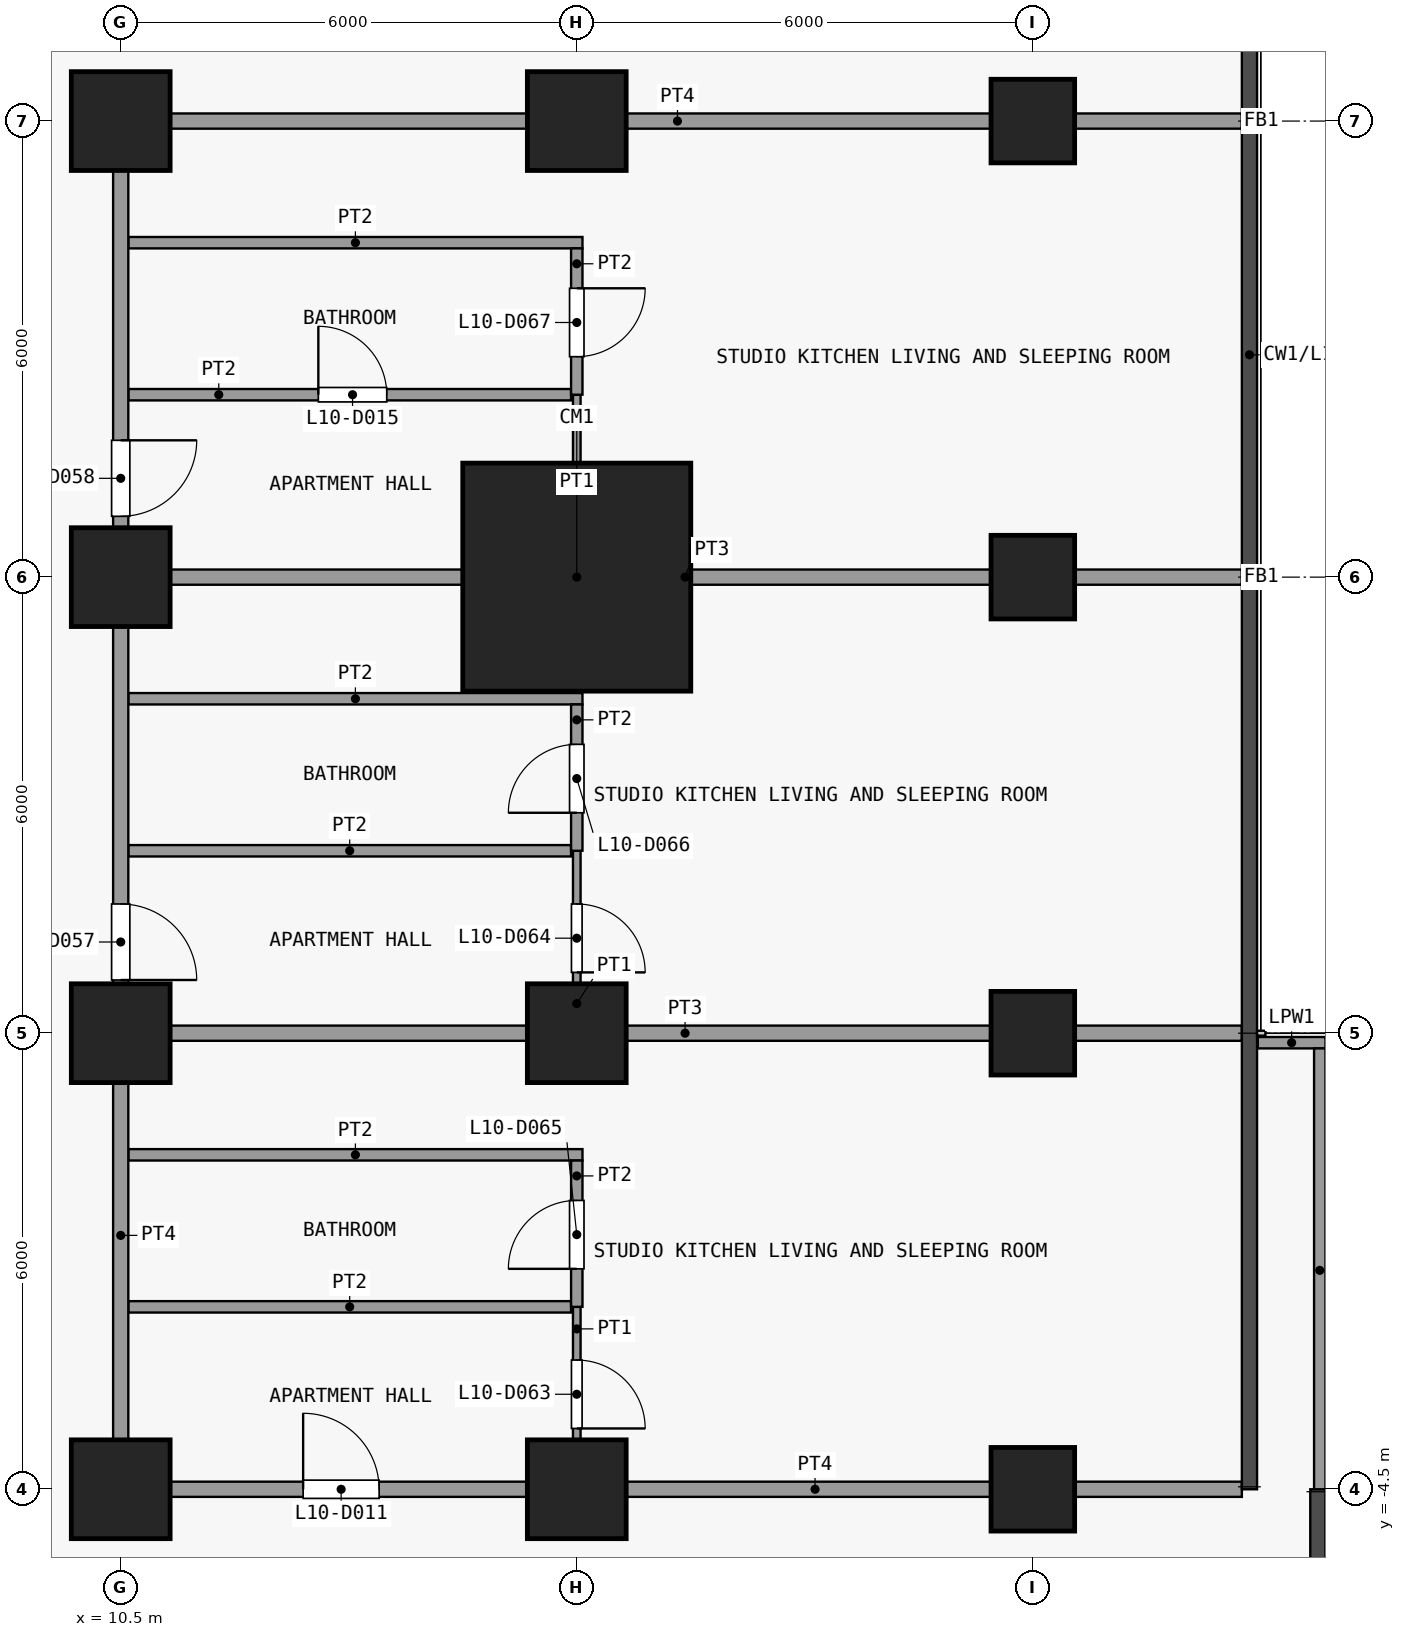
"""IFC4 building model, lengths in metres.
Left out: names, types, materials, properties, quantities, classifications, styles, units other than length and angle.
Written with IfcOpenShell. Run it as: python <this file> out.ifc"""

import sys

from ifc_helpers import new_model, si_unit, direction, frame, frame_2d, origin, origin_2d, place, context, subcontext, project, spatial, rectangle, extrude, element, fill, save


model = new_model("IFC4")
c1 = context("Model", 3, precision=1e-05, world=origin(), true_north=direction((0.0, 1.0)))
c2 = subcontext(c1, "Body", "Model", "MODEL_VIEW")
j1 = project(units=[si_unit("LENGTHUNIT", "METRE"), si_unit("PLANEANGLEUNIT", "RADIAN")], contexts=[c1])
p1 = place(None, origin())
s1 = spatial("IfcSite", under=j1, at=p1, CompositionType="ELEMENT")
p2 = place(p1, origin())
s2 = spatial("IfcBuilding", under=s1, at=p2, CompositionType="ELEMENT")
p3 = place(p2, frame((0.0, 0.0, 46.9)))
s3 = spatial("IfcBuildingStorey", under=s2, at=p3, CompositionType="ELEMENT", Elevation=46.9)
for number, where, z_axis, x_axis in (
    (1, (10.5, -4.5, 0.0), (0.0, 0.0, 1.0), (1.0, 0.0, 0.0)),
    (2, (10.5, 1.5, 0.0), (0.0, 0.0, 1.0), (1.0, 0.0, 0.0)),
    (3, (10.5, 7.5, 0.0), (0.0, 0.0, 1.0), (1.0, 0.0, 0.0)),
    (4, (10.5, 13.5, 0.0), (0.0, 0.0, 1.0), (1.0, 0.0, 0.0)),
    (5, (16.5, -4.5, 0.0), (0.0, 0.0, 1.0), (1.0, 0.0, 0.0)),
    (6, (16.5, 1.5, 0.0), (0.0, 0.0, 1.0), (1.0, 0.0, 0.0)),
):
    element("IfcColumn", number, at=place(p3, frame(where, z_axis=z_axis, x_axis=x_axis)), inside=s3, PredefinedType="COLUMN", context=c2, shape_type="SweptSolid", body=[
        extrude(rectangle(XDim=1.3, YDim=1.3, at=origin_2d()), origin(), (0.0, 0.0, 1.0), 3.6),
    ])
p4 = place(p3, frame((16.5, 7.5, 0.0), z_axis=(0.0, 0.0, 1.0), x_axis=(1.0, 0.0, 0.0)))
e7 = element("IfcColumn", 7, at=p4, inside=s3, PredefinedType="COLUMN", context=c2, shape_type="SweptSolid", body=[
    extrude(rectangle(XDim=3.0, YDim=3.0, at=origin_2d()), origin(), (0.0, 0.0, 1.0), 3.6),
])
p5 = place(p3, frame((16.5, 13.5, 0.0), z_axis=(0.0, 0.0, 1.0), x_axis=(1.0, 0.0, 0.0)))
e8 = element("IfcColumn", 8, at=p5, inside=s3, PredefinedType="COLUMN", context=c2, shape_type="SweptSolid", body=[
    extrude(rectangle(XDim=1.3, YDim=1.3, at=origin_2d()), origin(), (0.0, 0.0, 1.0), 3.6),
])
for number, where, z_axis, x_axis in (
    (9, (22.5, -4.5, 0.0), (0.0, 0.0, 1.0), (1.0, 0.0, 0.0)),
    (10, (22.5, 1.5, 0.0), (0.0, 0.0, 1.0), (1.0, 0.0, 0.0)),
    (11, (22.5, 7.5, 0.0), (0.0, 0.0, 1.0), (1.0, 0.0, 0.0)),
    (12, (22.5, 13.5, 0.0), (0.0, 0.0, 1.0), (1.0, 0.0, 0.0)),
):
    element("IfcColumn", number, at=place(p3, frame(where, z_axis=z_axis, x_axis=x_axis)), inside=s3, PredefinedType="COLUMN", context=c2, shape_type="SweptSolid", body=[
        extrude(rectangle(XDim=1.1, YDim=1.1, at=origin_2d()), origin(), (0.0, 0.0, 1.0), 3.6),
    ])
p6 = place(p3, frame((25.46, 1.375, 0.0), z_axis=(0.0, 0.0, 1.0), x_axis=(1.0, 0.0, 0.0)))
e13 = element("IfcWall", 13, at=p6, inside=s3, PredefinedType="PARAPET", context=c2, shape_type="SweptSolid", body=[
    extrude(rectangle(XDim=0.89, YDim=0.15, at=frame_2d((0.445, 0.0))), origin(), (0.0, 0.0, 1.0), 1.15),
])
p7 = place(p3, frame((26.275, 1.3, 0.0), z_axis=(0.0, 0.0, 1.0), x_axis=(0.0, -1.0, 0.0)))
e14 = element("IfcWall", 14, at=p7, inside=s3, PredefinedType="PARAPET", context=c2, shape_type="SweptSolid", body=[
    extrude(rectangle(XDim=5.84, YDim=0.15, at=frame_2d((2.92, 0.0))), origin(), (0.0, 0.0, 1.0), 1.15),
])
p8 = place(p3, frame((10.4, -4.5, 0.0), z_axis=(0.0, 0.0, 1.0), x_axis=(1.0, 0.0, 0.0)))
e15 = element("IfcWall", 15, at=p8, inside=s3, PredefinedType="PARTITIONING", context=c2, shape_type="SweptSolid", body=[
    extrude(rectangle(XDim=14.85, YDim=0.2, at=frame_2d((7.425, 0.0))), origin(), (0.0, 0.0, 1.0), 3.3),
])
p9 = place(p8, frame((2.5, 0.0, 0.0)))
e16 = element("IfcOpeningElement", 16, at=p9, cuts=e15, PredefinedType="OPENING", context=c2, shape_type="SweptSolid", body=[
    extrude(rectangle(XDim=1.0, YDim=2.1, at=frame_2d((0.5, 1.05))), frame((0.0, 0.11, 0.0), z_axis=(0.0, -1.0, 0.0), x_axis=(1.0, 0.0, 0.0)), (0.0, 0.0, 1.0), 0.22),
])
p10 = place(p3, frame((10.6, -2.1, 0.0), z_axis=(0.0, 0.0, 1.0), x_axis=(1.0, 0.0, 0.0)))
e17 = element("IfcWall", 17, at=p10, inside=s3, PredefinedType="PARTITIONING", context=c2, shape_type="SweptSolid", body=[
    extrude(rectangle(XDim=5.825, YDim=0.15, at=frame_2d((2.913, 0.0))), origin(), (0.0, 0.0, 1.0), 3.3),
])
p11 = place(p3, frame((10.6, -0.1, 0.0), z_axis=(0.0, 0.0, 1.0), x_axis=(1.0, 0.0, 0.0)))
e18 = element("IfcWall", 18, at=p11, inside=s3, PredefinedType="PARTITIONING", context=c2, shape_type="SweptSolid", body=[
    extrude(rectangle(XDim=5.975, YDim=0.15, at=frame_2d((2.987, 0.0))), origin(), (0.0, 0.0, 1.0), 3.3),
])
p12 = place(p3, frame((10.6, 1.5, 0.0), z_axis=(0.0, 0.0, 1.0), x_axis=(1.0, 0.0, 0.0)))
e19 = element("IfcWall", 19, at=p12, inside=s3, PredefinedType="PARTITIONING", context=c2, shape_type="SweptSolid", body=[
    extrude(rectangle(XDim=14.65, YDim=0.2, at=frame_2d((7.325, 0.0))), origin(), (0.0, 0.0, 1.0), 3.3),
])
p13 = place(p3, frame((10.6, 3.9, 0.0), z_axis=(0.0, 0.0, 1.0), x_axis=(1.0, 0.0, 0.0)))
e20 = element("IfcWall", 20, at=p13, inside=s3, PredefinedType="PARTITIONING", context=c2, shape_type="SweptSolid", body=[
    extrude(rectangle(XDim=5.825, YDim=0.15, at=frame_2d((2.913, 0.0))), origin(), (0.0, 0.0, 1.0), 3.3),
])
p14 = place(p3, frame((10.6, 5.9, 0.0), z_axis=(0.0, 0.0, 1.0), x_axis=(1.0, 0.0, 0.0)))
e21 = element("IfcWall", 21, at=p14, inside=s3, PredefinedType="PARTITIONING", context=c2, shape_type="SweptSolid", body=[
    extrude(rectangle(XDim=5.975, YDim=0.15, at=frame_2d((2.987, 0.0))), origin(), (0.0, 0.0, 1.0), 3.3),
])
p15 = place(p3, frame((10.6, 7.5, 0.0), z_axis=(0.0, 0.0, 1.0), x_axis=(1.0, 0.0, 0.0)))
e22 = element("IfcWall", 22, at=p15, inside=s3, PredefinedType="PARTITIONING", context=c2, shape_type="SweptSolid", body=[
    extrude(rectangle(XDim=14.65, YDim=0.2, at=frame_2d((7.325, 0.0))), origin(), (0.0, 0.0, 1.0), 3.3),
])
p16 = place(p3, frame((10.6, 9.9, 0.0), z_axis=(0.0, 0.0, 1.0), x_axis=(1.0, 0.0, 0.0)))
e23 = element("IfcWall", 23, at=p16, inside=s3, PredefinedType="PARTITIONING", context=c2, shape_type="SweptSolid", body=[
    extrude(rectangle(XDim=5.825, YDim=0.15, at=frame_2d((2.913, 0.0))), origin(), (0.0, 0.0, 1.0), 3.3),
])
p17 = place(p16, frame((2.5, 0.0, 0.0)))
e24 = element("IfcOpeningElement", 24, at=p17, cuts=e23, PredefinedType="OPENING", context=c2, shape_type="SweptSolid", body=[
    extrude(rectangle(XDim=0.9, YDim=2.1, at=frame_2d((0.45, 1.05))), frame((0.0, 0.085, 0.0), z_axis=(0.0, -1.0, 0.0), x_axis=(1.0, 0.0, 0.0)), (0.0, 0.0, 1.0), 0.17),
])
p18 = place(p3, frame((10.6, 11.9, 0.0), z_axis=(0.0, 0.0, 1.0), x_axis=(1.0, 0.0, 0.0)))
e25 = element("IfcWall", 25, at=p18, inside=s3, PredefinedType="PARTITIONING", context=c2, shape_type="SweptSolid", body=[
    extrude(rectangle(XDim=5.975, YDim=0.15, at=frame_2d((2.987, 0.0))), origin(), (0.0, 0.0, 1.0), 3.3),
])
p19 = place(p3, frame((10.4, 13.5, 0.0), z_axis=(0.0, 0.0, 1.0), x_axis=(1.0, 0.0, 0.0)))
e26 = element("IfcWall", 26, at=p19, inside=s3, PredefinedType="PARTITIONING", context=c2, shape_type="SweptSolid", body=[
    extrude(rectangle(XDim=14.85, YDim=0.2, at=frame_2d((7.425, 0.0))), origin(), (0.0, 0.0, 1.0), 3.3),
])
p20 = place(p3, frame((10.5, -4.4, 0.0), z_axis=(0.0, 0.0, 1.0), x_axis=(0.0, 1.0, 0.0)))
e27 = element("IfcWall", 27, at=p20, inside=s3, PredefinedType="PARTITIONING", context=c2, shape_type="SweptSolid", body=[
    extrude(rectangle(XDim=17.8, YDim=0.2, at=frame_2d((8.9, 0.0))), origin(), (0.0, 0.0, 1.0), 3.3),
])
p21 = place(p20, frame((6.6, 0.0, 0.0)))
e28 = element("IfcOpeningElement", 28, at=p21, cuts=e27, PredefinedType="OPENING", context=c2, shape_type="SweptSolid", body=[
    extrude(rectangle(XDim=1.0, YDim=2.1, at=frame_2d((0.5, 1.05))), frame((0.0, 0.11, 0.0), z_axis=(0.0, -1.0, 0.0), x_axis=(1.0, 0.0, 0.0)), (0.0, 0.0, 1.0), 0.22),
])
p22 = place(p20, frame((12.7, 0.0, 0.0)))
e29 = element("IfcOpeningElement", 29, at=p22, cuts=e27, PredefinedType="OPENING", context=c2, shape_type="SweptSolid", body=[
    extrude(rectangle(XDim=1.0, YDim=2.1, at=frame_2d((0.5, 1.05))), frame((0.0, 0.11, 0.0), z_axis=(0.0, -1.0, 0.0), x_axis=(1.0, 0.0, 0.0)), (0.0, 0.0, 1.0), 0.22),
])
p23 = place(p3, frame((16.5, -4.4, 0.0), z_axis=(0.0, 0.0, 1.0), x_axis=(0.0, 1.0, 0.0)))
e30 = element("IfcWall", 30, at=p23, inside=s3, PredefinedType="PARTITIONING", context=c2, shape_type="SweptSolid", body=[
    extrude(rectangle(XDim=2.3, YDim=0.1, at=frame_2d((1.15, 0.0))), origin(), (0.0, 0.0, 1.0), 3.3),
])
p24 = place(p23, frame((0.7, 0.0, 0.0)))
e31 = element("IfcOpeningElement", 31, at=p24, cuts=e30, PredefinedType="OPENING", context=c2, shape_type="SweptSolid", body=[
    extrude(rectangle(XDim=0.9, YDim=2.1, at=frame_2d((0.45, 1.05))), frame((0.0, 0.06, 0.0), z_axis=(0.0, -1.0, 0.0), x_axis=(1.0, 0.0, 0.0)), (0.0, 0.0, 1.0), 0.12),
])
p25 = place(p3, frame((16.5, 1.6, 0.0), z_axis=(0.0, 0.0, 1.0), x_axis=(0.0, 1.0, 0.0)))
e32 = element("IfcWall", 32, at=p25, inside=s3, PredefinedType="PARTITIONING", context=c2, shape_type="SweptSolid", body=[
    extrude(rectangle(XDim=2.3, YDim=0.1, at=frame_2d((1.15, 0.0))), origin(), (0.0, 0.0, 1.0), 3.3),
])
p26 = place(p25, frame((0.7, 0.0, 0.0)))
e33 = element("IfcOpeningElement", 33, at=p26, cuts=e32, PredefinedType="OPENING", context=c2, shape_type="SweptSolid", body=[
    extrude(rectangle(XDim=0.9, YDim=2.1, at=frame_2d((0.45, 1.05))), frame((0.0, 0.06, 0.0), z_axis=(0.0, -1.0, 0.0), x_axis=(1.0, 0.0, 0.0)), (0.0, 0.0, 1.0), 0.12),
])
p27 = place(p3, frame((16.5, 7.6, 0.0), z_axis=(0.0, 0.0, 1.0), x_axis=(0.0, 1.0, 0.0)))
e34 = element("IfcWall", 34, at=p27, inside=s3, PredefinedType="PARTITIONING", context=c2, shape_type="SweptSolid", body=[
    extrude(rectangle(XDim=2.3, YDim=0.1, at=frame_2d((1.15, 0.0))), origin(), (0.0, 0.0, 1.0), 3.3),
])
p28 = place(p3, frame((16.5, -2.1, 0.0), z_axis=(0.0, 0.0, 1.0), x_axis=(0.0, 1.0, 0.0)))
e35 = element("IfcWall", 35, at=p28, inside=s3, PredefinedType="PARTITIONING", context=c2, shape_type="SweptSolid", body=[
    extrude(rectangle(XDim=1.925, YDim=0.15, at=frame_2d((0.962, 0.0))), origin(), (0.0, 0.0, 1.0), 3.3),
])
p29 = place(p28, frame((0.5, 0.0, 0.0)))
e36 = element("IfcOpeningElement", 36, at=p29, cuts=e35, PredefinedType="OPENING", context=c2, shape_type="SweptSolid", body=[
    extrude(rectangle(XDim=0.9, YDim=2.1, at=frame_2d((0.45, 1.05))), frame((0.0, 0.085, 0.0), z_axis=(0.0, -1.0, 0.0), x_axis=(1.0, 0.0, 0.0)), (0.0, 0.0, 1.0), 0.17),
])
p30 = place(p3, frame((16.5, 3.9, 0.0), z_axis=(0.0, 0.0, 1.0), x_axis=(0.0, 1.0, 0.0)))
e37 = element("IfcWall", 37, at=p30, inside=s3, PredefinedType="PARTITIONING", context=c2, shape_type="SweptSolid", body=[
    extrude(rectangle(XDim=1.925, YDim=0.15, at=frame_2d((0.962, 0.0))), origin(), (0.0, 0.0, 1.0), 3.3),
])
p31 = place(p30, frame((0.5, 0.0, 0.0)))
e38 = element("IfcOpeningElement", 38, at=p31, cuts=e37, PredefinedType="OPENING", context=c2, shape_type="SweptSolid", body=[
    extrude(rectangle(XDim=0.9, YDim=2.1, at=frame_2d((0.45, 1.05))), frame((0.0, 0.085, 0.0), z_axis=(0.0, -1.0, 0.0), x_axis=(1.0, 0.0, 0.0)), (0.0, 0.0, 1.0), 0.17),
])
p32 = place(p3, frame((16.5, 9.9, 0.0), z_axis=(0.0, 0.0, 1.0), x_axis=(0.0, 1.0, 0.0)))
e39 = element("IfcWall", 39, at=p32, inside=s3, PredefinedType="PARTITIONING", context=c2, shape_type="SweptSolid", body=[
    extrude(rectangle(XDim=1.925, YDim=0.15, at=frame_2d((0.962, 0.0))), origin(), (0.0, 0.0, 1.0), 3.3),
])
p33 = place(p32, frame((0.5, 0.0, 0.0)))
e40 = element("IfcOpeningElement", 40, at=p33, cuts=e39, PredefinedType="OPENING", context=c2, shape_type="SweptSolid", body=[
    extrude(rectangle(XDim=0.9, YDim=2.1, at=frame_2d((0.45, 1.05))), frame((0.0, 0.085, 0.0), z_axis=(0.0, -1.0, 0.0), x_axis=(1.0, 0.0, 0.0)), (0.0, 0.0, 1.0), 0.17),
])
p34 = place(p9, origin())
e41 = element("IfcDoor", 41, at=p34, inside=s3, OperationType="SINGLE_SWING_RIGHT", PredefinedType="DOOR", context=c2, shape_type="SweptSolid", body=[
    extrude(rectangle(XDim=1.0, YDim=2.1, at=frame_2d((0.5, 1.05))), frame((0.0, 0.025, 0.0), z_axis=(0.0, -1.0, 0.0), x_axis=(1.0, 0.0, 0.0)), (0.0, 0.0, 1.0), 0.05),
])
fill(e16, e41)
p35 = place(p17, origin())
e42 = element("IfcDoor", 42, at=p35, inside=s3, OperationType="SINGLE_SWING_RIGHT", PredefinedType="DOOR", context=c2, shape_type="SweptSolid", body=[
    extrude(rectangle(XDim=0.9, YDim=2.1, at=frame_2d((0.45, 1.05))), frame((0.0, 0.025, 0.0), z_axis=(0.0, -1.0, 0.0), x_axis=(1.0, 0.0, 0.0)), (0.0, 0.0, 1.0), 0.05),
])
fill(e24, e42)
p36 = place(p21, origin())
e43 = element("IfcDoor", 43, at=p36, inside=s3, OperationType="SINGLE_SWING_LEFT", PredefinedType="DOOR", context=c2, shape_type="SweptSolid", body=[
    extrude(rectangle(XDim=1.0, YDim=2.1, at=frame_2d((0.5, 1.05))), frame((0.0, 0.025, 0.0), z_axis=(0.0, -1.0, 0.0), x_axis=(1.0, 0.0, 0.0)), (0.0, 0.0, 1.0), 0.05),
])
fill(e28, e43)
p37 = place(p22, origin())
e44 = element("IfcDoor", 44, at=p37, inside=s3, OperationType="SINGLE_SWING_RIGHT", PredefinedType="DOOR", context=c2, shape_type="SweptSolid", body=[
    extrude(rectangle(XDim=1.0, YDim=2.1, at=frame_2d((0.5, 1.05))), frame((0.0, 0.025, 0.0), z_axis=(0.0, -1.0, 0.0), x_axis=(1.0, 0.0, 0.0)), (0.0, 0.0, 1.0), 0.05),
])
fill(e29, e44)
p38 = place(p24, origin())
e45 = element("IfcDoor", 45, at=p38, inside=s3, OperationType="SINGLE_SWING_LEFT", PredefinedType="DOOR", context=c2, shape_type="SweptSolid", body=[
    extrude(rectangle(XDim=0.9, YDim=2.1, at=frame_2d((0.45, 1.05))), frame((0.0, 0.025, 0.0), z_axis=(0.0, -1.0, 0.0), x_axis=(1.0, 0.0, 0.0)), (0.0, 0.0, 1.0), 0.05),
])
fill(e31, e45)
p39 = place(p26, origin())
e46 = element("IfcDoor", 46, at=p39, inside=s3, OperationType="SINGLE_SWING_LEFT", PredefinedType="DOOR", context=c2, shape_type="SweptSolid", body=[
    extrude(rectangle(XDim=0.9, YDim=2.1, at=frame_2d((0.45, 1.05))), frame((0.0, 0.025, 0.0), z_axis=(0.0, -1.0, 0.0), x_axis=(1.0, 0.0, 0.0)), (0.0, 0.0, 1.0), 0.05),
])
fill(e33, e46)
p40 = place(p29, origin())
e47 = element("IfcDoor", 47, at=p40, inside=s3, OperationType="SINGLE_SWING_RIGHT", PredefinedType="DOOR", context=c2, shape_type="SweptSolid", body=[
    extrude(rectangle(XDim=0.9, YDim=2.1, at=frame_2d((0.45, 1.05))), frame((0.0, 0.025, 0.0), z_axis=(0.0, -1.0, 0.0), x_axis=(1.0, 0.0, 0.0)), (0.0, 0.0, 1.0), 0.05),
])
fill(e36, e47)
p41 = place(p31, origin())
e48 = element("IfcDoor", 48, at=p41, inside=s3, OperationType="SINGLE_SWING_RIGHT", PredefinedType="DOOR", context=c2, shape_type="SweptSolid", body=[
    extrude(rectangle(XDim=0.9, YDim=2.1, at=frame_2d((0.45, 1.05))), frame((0.0, 0.025, 0.0), z_axis=(0.0, -1.0, 0.0), x_axis=(1.0, 0.0, 0.0)), (0.0, 0.0, 1.0), 0.05),
])
fill(e38, e48)
p42 = place(p33, origin())
e49 = element("IfcDoor", 49, at=p42, inside=s3, OperationType="SINGLE_SWING_RIGHT", PredefinedType="DOOR", context=c2, shape_type="SweptSolid", body=[
    extrude(rectangle(XDim=0.9, YDim=2.1, at=frame_2d((0.45, 1.05))), frame((0.0, 0.025, 0.0), z_axis=(0.0, -1.0, 0.0), x_axis=(1.0, 0.0, 0.0)), (0.0, 0.0, 1.0), 0.05),
])
fill(e40, e49)
save(model, sys.argv[1])
